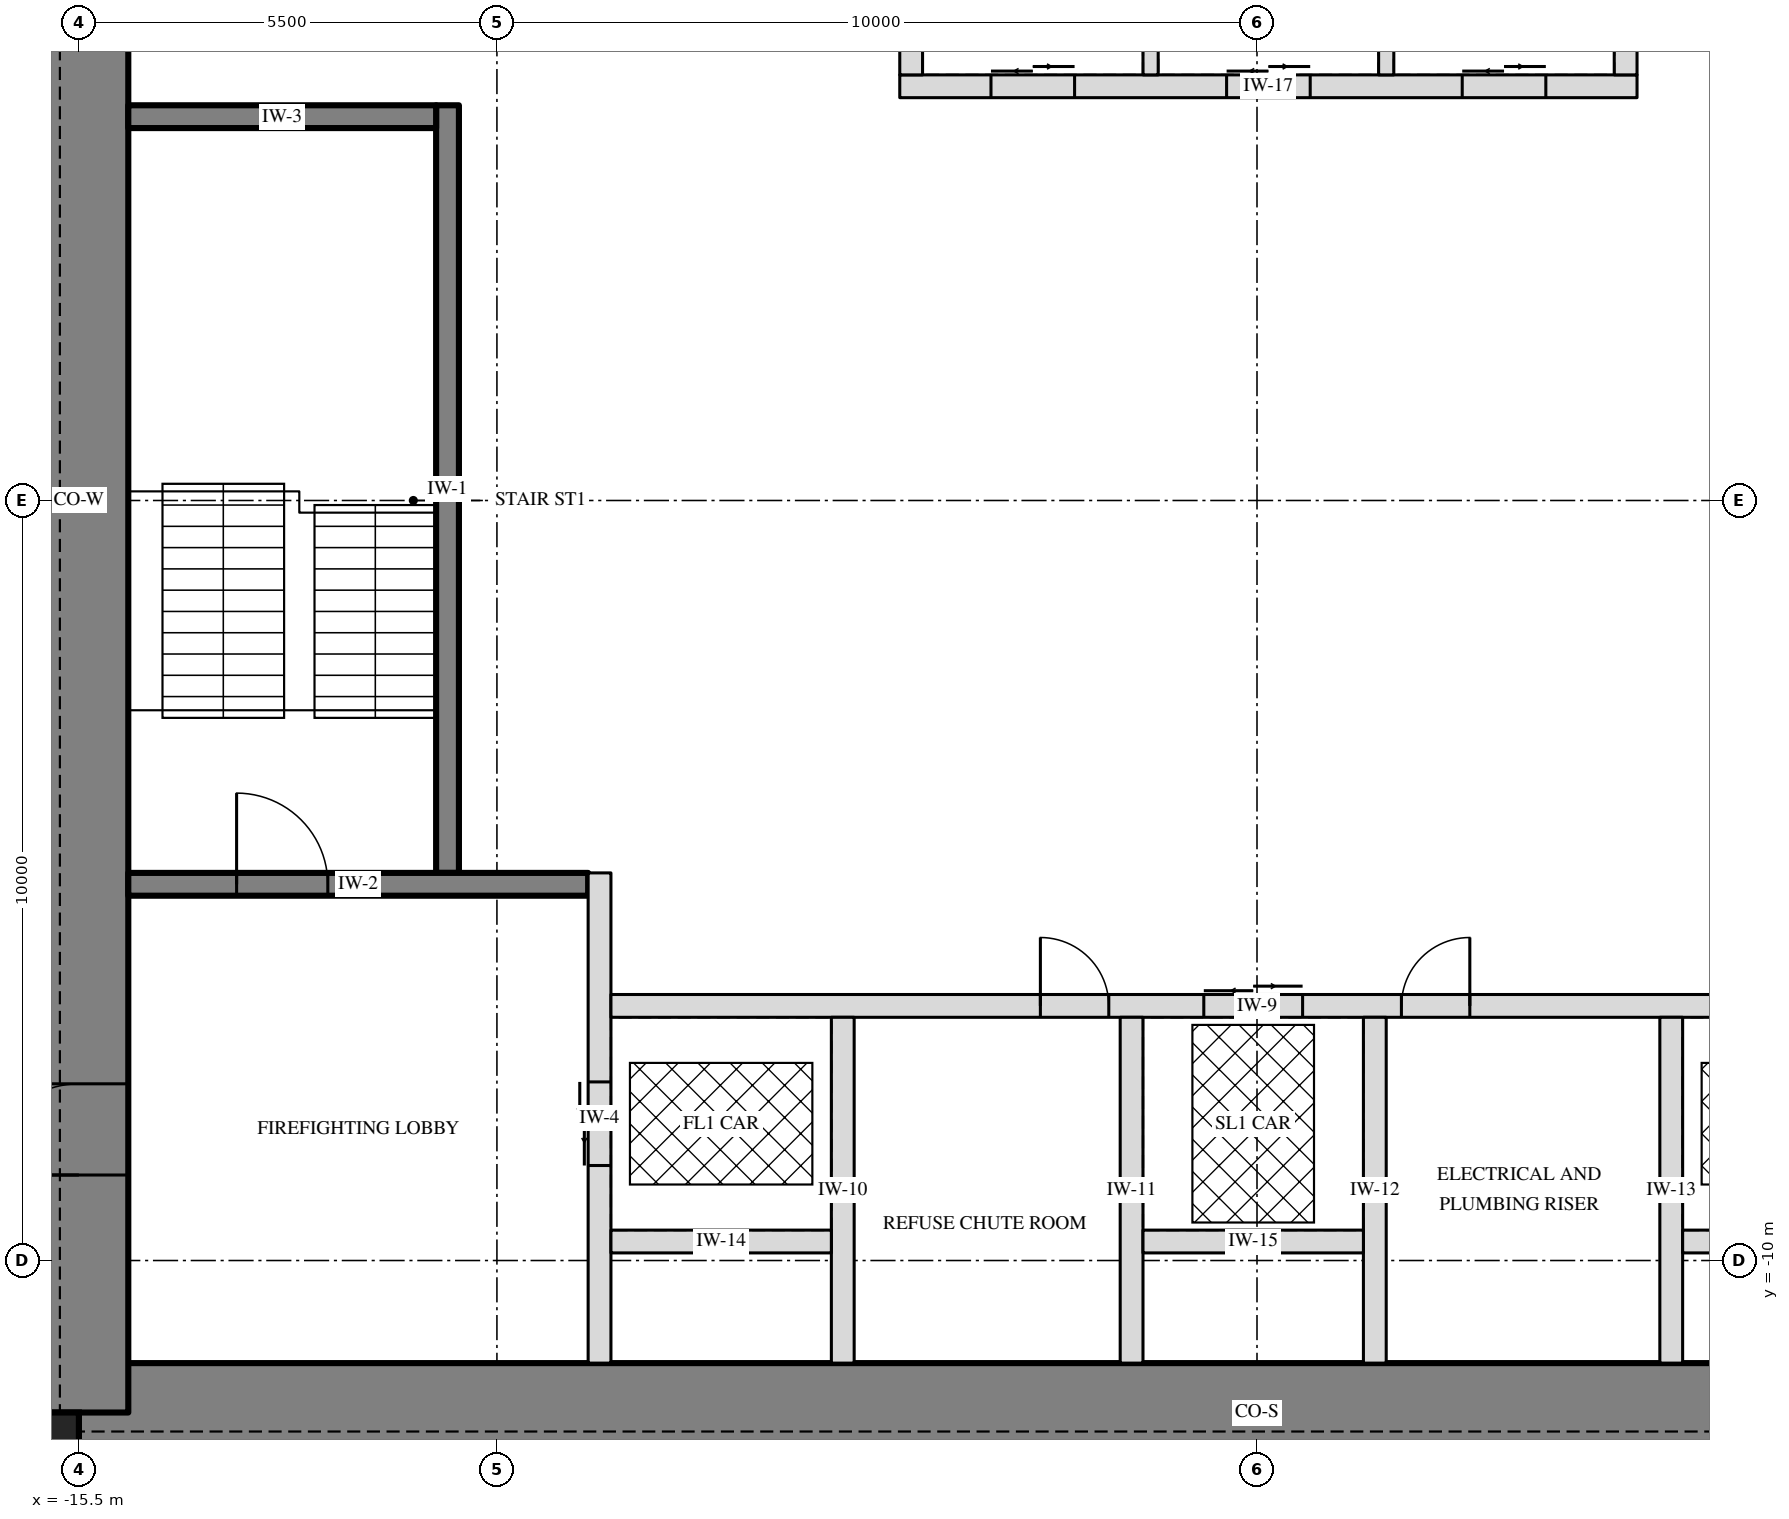
"""IFC4 building model, lengths in metres.
Left out: names, types, materials, properties, quantities, classifications, styles, units other than length and angle.
Written with IfcOpenShell. Run it as: python <this file> out.ifc"""

import sys

from ifc_helpers import new_model, si_unit, direction, frame, frame_2d, origin, origin_2d, place, context, subcontext, project, spatial, rectangle, extrude, element, fill, save


model = new_model("IFC4")
c1 = context("Model", 3, precision=1e-05, world=origin(), true_north=direction((0.0, 1.0)))
c2 = subcontext(c1, "Body", "Model", "MODEL_VIEW")
j1 = project(units=[si_unit("LENGTHUNIT", "METRE"), si_unit("PLANEANGLEUNIT", "RADIAN")], contexts=[c1])
p1 = place(None, origin())
s1 = spatial("IfcSite", under=j1, at=p1, CompositionType="ELEMENT")
p2 = place(p1, origin())
s2 = spatial("IfcBuilding", under=s1, at=p2, CompositionType="ELEMENT")
p3 = place(p2, frame((0.0, 0.0, 285.75)))
s3 = spatial("IfcBuildingStorey", under=s2, at=p3, CompositionType="ELEMENT", Elevation=285.75)
p4 = place(p3, frame((-15.5, -12.0, -0.25), z_axis=(0.0, 0.0, 1.0), x_axis=(1.0, 0.0, 0.0)))
e1 = element("IfcWall", 1, at=p4, inside=s3, PredefinedType="SHEAR", context=c2, shape_type="SweptSolid", body=[
    extrude(rectangle(XDim=31.0, YDim=1.3, at=frame_2d((15.5, 0.0))), origin(), (0.0, 0.0, 1.0), 3.75),
])
p5 = place(p3, frame((-15.5, -12.0, -0.25), z_axis=(0.0, 0.0, 1.0), x_axis=(0.0, 1.0, 0.0)))
e2 = element("IfcWall", 2, at=p5, inside=s3, PredefinedType="SHEAR", context=c2, shape_type="SweptSolid", body=[
    extrude(rectangle(XDim=24.0, YDim=1.3, at=frame_2d((12.0, 0.0))), origin(), (0.0, 0.0, 1.0), 3.75),
])
p6 = place(p5, frame((3.125, 0.0, 0.25)))
e3 = element("IfcOpeningElement", 3, at=p6, cuts=e2, PredefinedType="OPENING", context=c2, shape_type="SweptSolid", body=[
    extrude(rectangle(XDim=1.2, YDim=2.1, at=frame_2d((0.6, 1.05))), frame((0.0, 0.66, 0.0), z_axis=(0.0, -1.0, 0.0), x_axis=(1.0, 0.0, 0.0)), (0.0, 0.0, 1.0), 1.32),
])
p7 = place(p5, frame((19.375, 0.0, 0.25)))
e4 = element("IfcOpeningElement", 4, at=p7, cuts=e2, PredefinedType="OPENING", context=c2, shape_type="SweptSolid", body=[
    extrude(rectangle(XDim=1.8, YDim=2.1, at=frame_2d((0.9, 1.05))), frame((0.0, 0.66, 0.0), z_axis=(0.0, -1.0, 0.0), x_axis=(1.0, 0.0, 0.0)), (0.0, 0.0, 1.0), 1.32),
])
p8 = place(p3, frame((-15.825, -12.325, -0.25), z_axis=(0.0, 0.0, 1.0), x_axis=(1.0, 0.0, 0.0)))
e5 = element("IfcColumn", 5, at=p8, inside=s3, PredefinedType="COLUMN", context=c2, shape_type="SweptSolid", body=[
    extrude(rectangle(XDim=0.65, YDim=0.65, at=origin_2d()), origin(), (0.0, 0.0, 1.0), 3.75),
])
p9 = place(p3, frame((-10.65, -4.9, 0.0), z_axis=(0.0, 0.0, 1.0), x_axis=(0.0, 1.0, 0.0)))
e6 = element("IfcWall", 6, at=p9, inside=s3, PredefinedType="SOLIDWALL", context=c2, shape_type="SweptSolid", body=[
    extrude(rectangle(XDim=10.1, YDim=0.3, at=frame_2d((5.05, 0.0))), origin(), (0.0, 0.0, 1.0), 3.5),
])
p10 = place(p3, frame((-14.85, -5.05, 0.0), z_axis=(0.0, 0.0, 1.0), x_axis=(1.0, 0.0, 0.0)))
e7 = element("IfcWall", 7, at=p10, inside=s3, PredefinedType="SOLIDWALL", context=c2, shape_type="SweptSolid", body=[
    extrude(rectangle(XDim=6.05, YDim=0.3, at=frame_2d((3.025, 0.0))), origin(), (0.0, 0.0, 1.0), 3.5),
])
p11 = place(p10, frame((1.425, 0.0, 0.0)))
e8 = element("IfcOpeningElement", 8, at=p11, cuts=e7, PredefinedType="OPENING", context=c2, shape_type="SweptSolid", body=[
    extrude(rectangle(XDim=1.2, YDim=2.1, at=frame_2d((0.6, 1.05))), frame((0.0, 0.16, 0.0), z_axis=(0.0, -1.0, 0.0), x_axis=(1.0, 0.0, 0.0)), (0.0, 0.0, 1.0), 0.32),
])
p12 = place(p3, frame((-14.85, 5.05, 0.0), z_axis=(0.0, 0.0, 1.0), x_axis=(1.0, 0.0, 0.0)))
e9 = element("IfcWall", 9, at=p12, inside=s3, PredefinedType="SOLIDWALL", context=c2, shape_type="SweptSolid", body=[
    extrude(rectangle(XDim=4.05, YDim=0.3, at=frame_2d((2.025, 0.0))), origin(), (0.0, 0.0, 1.0), 3.5),
])
p13 = place(p3, frame((-8.65, -11.35, 0.0), z_axis=(0.0, 0.0, 1.0), x_axis=(0.0, 1.0, 0.0)))
e10 = element("IfcWall", 10, at=p13, inside=s3, PredefinedType="PARTITIONING", context=c2, shape_type="SweptSolid", body=[
    extrude(rectangle(XDim=6.45, YDim=0.3, at=frame_2d((3.225, 0.0))), origin(), (0.0, 0.0, 1.0), 3.5),
])
p14 = place(p13, frame((2.6, 0.0, 0.0)))
e11 = element("IfcOpeningElement", 11, at=p14, cuts=e10, PredefinedType="OPENING", context=c2, shape_type="SweptSolid", body=[
    extrude(rectangle(XDim=1.1, YDim=2.1, at=frame_2d((0.55, 1.05))), frame((0.0, 0.16, 0.0), z_axis=(0.0, -1.0, 0.0), x_axis=(1.0, 0.0, 0.0)), (0.0, 0.0, 1.0), 0.32),
])
p15 = place(p3, frame((-8.5, -6.65, 0.0), z_axis=(0.0, 0.0, 1.0), x_axis=(1.0, 0.0, 0.0)))
e12 = element("IfcWall", 12, at=p15, inside=s3, PredefinedType="PARTITIONING", context=c2, shape_type="SweptSolid", body=[
    extrude(rectangle(XDim=17.0, YDim=0.3, at=frame_2d((8.5, 0.0))), origin(), (0.0, 0.0, 1.0), 3.5),
])
p16 = place(p15, frame((7.8, 0.0, 0.0)))
e13 = element("IfcOpeningElement", 13, at=p16, cuts=e12, PredefinedType="OPENING", context=c2, shape_type="SweptSolid", body=[
    extrude(rectangle(XDim=1.3, YDim=2.4, at=frame_2d((0.65, 1.2))), frame((0.0, 0.16, 0.0), z_axis=(0.0, -1.0, 0.0), x_axis=(1.0, 0.0, 0.0)), (0.0, 0.0, 1.0), 0.32),
])
p17 = place(p15, frame((5.65, 0.0, 0.0)))
e14 = element("IfcOpeningElement", 14, at=p17, cuts=e12, PredefinedType="OPENING", context=c2, shape_type="SweptSolid", body=[
    extrude(rectangle(XDim=0.9, YDim=2.1, at=frame_2d((0.45, 1.05))), frame((0.0, 0.16, 0.0), z_axis=(0.0, -1.0, 0.0), x_axis=(1.0, 0.0, 0.0)), (0.0, 0.0, 1.0), 0.32),
])
p18 = place(p15, frame((10.4, 0.0, 0.0)))
e15 = element("IfcOpeningElement", 15, at=p18, cuts=e12, PredefinedType="OPENING", context=c2, shape_type="SweptSolid", body=[
    extrude(rectangle(XDim=0.9, YDim=2.1, at=frame_2d((0.45, 1.05))), frame((0.0, 0.16, 0.0), z_axis=(0.0, -1.0, 0.0), x_axis=(1.0, 0.0, 0.0)), (0.0, 0.0, 1.0), 0.32),
])
for number, where, z_axis, x_axis in (
    (16, (-5.45, -11.35, 0.0), (0.0, 0.0, 1.0), (0.0, 1.0, 0.0)),
    (17, (-1.65, -11.35, 0.0), (0.0, 0.0, 1.0), (0.0, 1.0, 0.0)),
    (18, (1.55, -11.35, 0.0), (0.0, 0.0, 1.0), (0.0, 1.0, 0.0)),
    (19, (5.45, -11.35, 0.0), (0.0, 0.0, 1.0), (0.0, 1.0, 0.0)),
):
    element("IfcWall", number, at=place(p3, frame(where, z_axis=z_axis, x_axis=x_axis)), inside=s3, PredefinedType="PARTITIONING", context=c2, shape_type="SweptSolid", body=[
        extrude(rectangle(XDim=4.55, YDim=0.3, at=frame_2d((2.275, 0.0))), origin(), (0.0, 0.0, 1.0), 3.5),
    ])
for number, where, z_axis, x_axis in (
    (20, (-8.5, -9.75, 0.0), (0.0, 0.0, 1.0), (1.0, 0.0, 0.0)),
    (21, (-1.5, -9.75, 0.0), (0.0, 0.0, 1.0), (1.0, 0.0, 0.0)),
    (22, (5.6, -9.75, 0.0), (0.0, 0.0, 1.0), (1.0, 0.0, 0.0)),
):
    element("IfcWall", number, at=place(p3, frame(where, z_axis=z_axis, x_axis=x_axis)), inside=s3, PredefinedType="PARTITIONING", context=c2, shape_type="SweptSolid", body=[
        extrude(rectangle(XDim=2.9, YDim=0.3, at=frame_2d((1.45, 0.0))), origin(), (0.0, 0.0, 1.0), 3.5),
    ])
p19 = place(p3, frame((-4.7, 5.45, 0.0), z_axis=(0.0, 0.0, 1.0), x_axis=(1.0, 0.0, 0.0)))
e23 = element("IfcWall", 23, at=p19, inside=s3, PredefinedType="PARTITIONING", context=c2, shape_type="SweptSolid", body=[
    extrude(rectangle(XDim=9.7, YDim=0.3, at=frame_2d((4.85, 0.0))), origin(), (0.0, 0.0, 1.0), 3.5),
])
p20 = place(p19, frame((1.2, 0.0, 0.0)))
e24 = element("IfcOpeningElement", 24, at=p20, cuts=e23, PredefinedType="OPENING", context=c2, shape_type="SweptSolid", body=[
    extrude(rectangle(XDim=1.1, YDim=2.1, at=frame_2d((0.55, 1.05))), frame((0.0, 0.16, 0.0), z_axis=(0.0, -1.0, 0.0), x_axis=(1.0, 0.0, 0.0)), (0.0, 0.0, 1.0), 0.32),
])
p21 = place(p19, frame((4.3, 0.0, 0.0)))
e25 = element("IfcOpeningElement", 25, at=p21, cuts=e23, PredefinedType="OPENING", context=c2, shape_type="SweptSolid", body=[
    extrude(rectangle(XDim=1.1, YDim=2.1, at=frame_2d((0.55, 1.05))), frame((0.0, 0.16, 0.0), z_axis=(0.0, -1.0, 0.0), x_axis=(1.0, 0.0, 0.0)), (0.0, 0.0, 1.0), 0.32),
])
p22 = place(p19, frame((7.4, 0.0, 0.0)))
e26 = element("IfcOpeningElement", 26, at=p22, cuts=e23, PredefinedType="OPENING", context=c2, shape_type="SweptSolid", body=[
    extrude(rectangle(XDim=1.1, YDim=2.1, at=frame_2d((0.55, 1.05))), frame((0.0, 0.16, 0.0), z_axis=(0.0, -1.0, 0.0), x_axis=(1.0, 0.0, 0.0)), (0.0, 0.0, 1.0), 0.32),
])
for number, where, z_axis, x_axis in (
    (27, (-4.55, 5.6, 0.0), (0.0, 0.0, 1.0), (0.0, 1.0, 0.0)),
    (28, (4.85, 5.6, 0.0), (0.0, 0.0, 1.0), (0.0, 1.0, 0.0)),
):
    element("IfcWall", number, at=place(p3, frame(where, z_axis=z_axis, x_axis=x_axis)), inside=s3, PredefinedType="PARTITIONING", context=c2, shape_type="SweptSolid", body=[
        extrude(rectangle(XDim=2.8, YDim=0.3, at=frame_2d((1.4, 0.0))), origin(), (0.0, 0.0, 1.0), 3.5),
    ])
for number, where, z_axis, x_axis in (
    (29, (-1.4, 5.6, 0.0), (0.0, 0.0, 1.0), (0.0, 1.0, 0.0)),
    (30, (1.7, 5.6, 0.0), (0.0, 0.0, 1.0), (0.0, 1.0, 0.0)),
):
    element("IfcWall", number, at=place(p3, frame(where, z_axis=z_axis, x_axis=x_axis)), inside=s3, PredefinedType="PARTITIONING", context=c2, shape_type="SweptSolid", body=[
        extrude(rectangle(XDim=2.8, YDim=0.2, at=frame_2d((1.4, 0.0))), origin(), (0.0, 0.0, 1.0), 3.5),
    ])
p23 = place(p3, frame((-10.65, 2.8, 0.0), z_axis=(0.0, 0.0, 1.0), x_axis=(1.0, 0.0, 0.0)))
e31 = element("IfcWall", 31, at=p23, inside=s3, PredefinedType="PARTITIONING", context=c2, shape_type="SweptSolid", body=[
    extrude(rectangle(XDim=21.3, YDim=0.3, at=frame_2d((10.65, 0.0))), origin(), (0.0, 0.0, 1.0), 3.5),
])
p24 = place(p23, frame((10.05, 0.0, 0.0)))
e32 = element("IfcOpeningElement", 32, at=p24, cuts=e31, PredefinedType="OPENING", context=c2, shape_type="SweptSolid", body=[
    extrude(rectangle(XDim=1.2, YDim=2.1, at=frame_2d((0.6, 1.05))), frame((0.0, 0.16, 0.0), z_axis=(0.0, -1.0, 0.0), x_axis=(1.0, 0.0, 0.0)), (0.0, 0.0, 1.0), 0.32),
])
p25 = place(p23, frame((19.121, 0.0, 0.0)))
e33 = element("IfcOpeningElement", 33, at=p25, cuts=e31, PredefinedType="OPENING", context=c2, shape_type="SweptSolid", body=[
    extrude(rectangle(XDim=0.9, YDim=2.1, at=frame_2d((0.45, 1.05))), frame((0.0, 0.16, 0.0), z_axis=(0.0, -1.0, 0.0), x_axis=(1.0, 0.0, 0.0)), (0.0, 0.0, 1.0), 0.32),
])
p26 = place(p3, frame((-5.1, -6.65, 0.0), z_axis=(0.0, 0.0, 1.0), x_axis=(0.0, 1.0, 0.0)))
e34 = element("IfcWall", 34, at=p26, inside=s3, PredefinedType="PARTITIONING", context=c2, shape_type="SweptSolid", body=[
    extrude(rectangle(XDim=9.45, YDim=0.3, at=frame_2d((4.725, 0.0))), origin(), (0.0, 0.0, 1.0), 3.5),
])
p27 = place(p26, frame((2.648, 0.0, 0.0)))
e35 = element("IfcOpeningElement", 35, at=p27, cuts=e34, PredefinedType="OPENING", context=c2, shape_type="SweptSolid", body=[
    extrude(rectangle(XDim=0.9, YDim=2.1, at=frame_2d((0.45, 1.05))), frame((0.0, 0.16, 0.0), z_axis=(0.0, -1.0, 0.0), x_axis=(1.0, 0.0, 0.0)), (0.0, 0.0, 1.0), 0.32),
])
p28 = place(p26, frame((7.373, 0.0, 0.0)))
e36 = element("IfcOpeningElement", 36, at=p28, cuts=e34, PredefinedType="OPENING", context=c2, shape_type="SweptSolid", body=[
    extrude(rectangle(XDim=0.9, YDim=2.1, at=frame_2d((0.45, 1.05))), frame((0.0, 0.16, 0.0), z_axis=(0.0, -1.0, 0.0), x_axis=(1.0, 0.0, 0.0)), (0.0, 0.0, 1.0), 0.32),
])
p29 = place(p3, frame((5.1, -6.65, 0.0), z_axis=(0.0, 0.0, 1.0), x_axis=(0.0, 1.0, 0.0)))
e37 = element("IfcWall", 37, at=p29, inside=s3, PredefinedType="PARTITIONING", context=c2, shape_type="SweptSolid", body=[
    extrude(rectangle(XDim=9.45, YDim=0.3, at=frame_2d((4.725, 0.0))), origin(), (0.0, 0.0, 1.0), 3.5),
])
p30 = place(p29, frame((4.275, 0.0, 0.0)))
e38 = element("IfcOpeningElement", 38, at=p30, cuts=e37, PredefinedType="OPENING", context=c2, shape_type="SweptSolid", body=[
    extrude(rectangle(XDim=0.9, YDim=2.1, at=frame_2d((0.45, 1.05))), frame((0.0, 0.16, 0.0), z_axis=(0.0, -1.0, 0.0), x_axis=(1.0, 0.0, 0.0)), (0.0, 0.0, 1.0), 0.32),
])
p31 = place(p3, frame((-10.65, -0.455, 0.0), z_axis=(0.0, 0.0, 1.0), x_axis=(1.0, 0.0, 0.0)))
e39 = element("IfcWall", 39, at=p31, inside=s3, PredefinedType="PARTITIONING", context=c2, shape_type="SweptSolid", body=[
    extrude(rectangle(XDim=5.55, YDim=0.3, at=frame_2d((2.775, 0.0))), origin(), (0.0, 0.0, 1.0), 3.5),
])
p32 = place(p3, frame((-4.85, 5.3, 0.0), z_axis=(0.0, 0.0, 1.0), x_axis=(0.0, 1.0, 0.0)))
e40 = element("IfcWall", 40, at=p32, inside=s3, PredefinedType="PARTITIONING", context=c2, shape_type="SweptSolid", body=[
    extrude(rectangle(XDim=6.05, YDim=0.3, at=frame_2d((3.025, 0.0))), origin(), (0.0, 0.0, 1.0), 3.5),
])
p33 = place(p3, frame((5.15, 5.3, 0.0), z_axis=(0.0, 0.0, 1.0), x_axis=(0.0, 1.0, 0.0)))
e41 = element("IfcWall", 41, at=p33, inside=s3, PredefinedType="PARTITIONING", context=c2, shape_type="SweptSolid", body=[
    extrude(rectangle(XDim=6.05, YDim=0.3, at=frame_2d((3.025, 0.0))), origin(), (0.0, 0.0, 1.0), 3.5),
])
p34 = place(p33, frame((4.225, 0.0, 0.0)))
e42 = element("IfcOpeningElement", 42, at=p34, cuts=e41, PredefinedType="OPENING", context=c2, shape_type="SweptSolid", body=[
    extrude(rectangle(XDim=0.9, YDim=2.1, at=frame_2d((0.45, 1.05))), frame((0.0, 0.16, 0.0), z_axis=(0.0, -1.0, 0.0), x_axis=(1.0, 0.0, 0.0)), (0.0, 0.0, 1.0), 0.32),
])
p35 = place(p11, origin())
e43 = element("IfcDoor", 43, at=p35, inside=s3, OperationType="SINGLE_SWING_LEFT", PredefinedType="DOOR", context=c2, shape_type="SweptSolid", body=[
    extrude(rectangle(XDim=1.2, YDim=2.1, at=frame_2d((0.6, 1.05))), frame((0.0, 0.025, 0.0), z_axis=(0.0, -1.0, 0.0), x_axis=(1.0, 0.0, 0.0)), (0.0, 0.0, 1.0), 0.05),
])
fill(e8, e43)
p36 = place(p6, origin())
e44 = element("IfcDoor", 44, at=p36, inside=s3, OperationType="SINGLE_SWING_LEFT", PredefinedType="DOOR", context=c2, shape_type="SweptSolid", body=[
    extrude(rectangle(XDim=1.2, YDim=2.1, at=frame_2d((0.6, 1.05))), frame((0.0, 0.025, 0.0), z_axis=(0.0, -1.0, 0.0), x_axis=(1.0, 0.0, 0.0)), (0.0, 0.0, 1.0), 0.05),
])
fill(e3, e44)
p37 = place(p14, origin())
e45 = element("IfcDoor", 45, at=p37, inside=s3, OperationType="DOUBLE_DOOR_SLIDING", PredefinedType="DOOR", context=c2, shape_type="SweptSolid", body=[
    extrude(rectangle(XDim=1.1, YDim=2.1, at=frame_2d((0.55, 1.05))), frame((0.0, 0.025, 0.0), z_axis=(0.0, -1.0, 0.0), x_axis=(1.0, 0.0, 0.0)), (0.0, 0.0, 1.0), 0.05),
])
fill(e11, e45)
p38 = place(p20, origin())
e46 = element("IfcDoor", 46, at=p38, inside=s3, OperationType="DOUBLE_DOOR_SLIDING", PredefinedType="DOOR", context=c2, shape_type="SweptSolid", body=[
    extrude(rectangle(XDim=1.1, YDim=2.1, at=frame_2d((0.55, 1.05))), frame((0.0, 0.025, 0.0), z_axis=(0.0, -1.0, 0.0), x_axis=(1.0, 0.0, 0.0)), (0.0, 0.0, 1.0), 0.05),
])
fill(e24, e46)
p39 = place(p21, origin())
e47 = element("IfcDoor", 47, at=p39, inside=s3, OperationType="DOUBLE_DOOR_SLIDING", PredefinedType="DOOR", context=c2, shape_type="SweptSolid", body=[
    extrude(rectangle(XDim=1.1, YDim=2.1, at=frame_2d((0.55, 1.05))), frame((0.0, 0.025, 0.0), z_axis=(0.0, -1.0, 0.0), x_axis=(1.0, 0.0, 0.0)), (0.0, 0.0, 1.0), 0.05),
])
fill(e25, e47)
p40 = place(p22, origin())
e48 = element("IfcDoor", 48, at=p40, inside=s3, OperationType="DOUBLE_DOOR_SLIDING", PredefinedType="DOOR", context=c2, shape_type="SweptSolid", body=[
    extrude(rectangle(XDim=1.1, YDim=2.1, at=frame_2d((0.55, 1.05))), frame((0.0, 0.025, 0.0), z_axis=(0.0, -1.0, 0.0), x_axis=(1.0, 0.0, 0.0)), (0.0, 0.0, 1.0), 0.05),
])
fill(e26, e48)
p41 = place(p16, origin())
e49 = element("IfcDoor", 49, at=p41, inside=s3, OperationType="DOUBLE_DOOR_SLIDING", PredefinedType="DOOR", context=c2, shape_type="SweptSolid", body=[
    extrude(rectangle(XDim=1.3, YDim=2.4, at=frame_2d((0.65, 1.2))), frame((0.0, 0.025, 0.0), z_axis=(0.0, -1.0, 0.0), x_axis=(1.0, 0.0, 0.0)), (0.0, 0.0, 1.0), 0.05),
])
fill(e13, e49)
p42 = place(p24, origin())
e50 = element("IfcDoor", 50, at=p42, inside=s3, OperationType="SINGLE_SWING_LEFT", PredefinedType="DOOR", context=c2, shape_type="SweptSolid", body=[
    extrude(rectangle(XDim=1.2, YDim=2.1, at=frame_2d((0.6, 1.05))), frame((0.0, 0.025, 0.0), z_axis=(0.0, -1.0, 0.0), x_axis=(1.0, 0.0, 0.0)), (0.0, 0.0, 1.0), 0.05),
])
fill(e32, e50)
p43 = place(p17, origin())
e51 = element("IfcDoor", 51, at=p43, inside=s3, OperationType="SINGLE_SWING_LEFT", PredefinedType="DOOR", context=c2, shape_type="SweptSolid", body=[
    extrude(rectangle(XDim=0.9, YDim=2.1, at=frame_2d((0.45, 1.05))), frame((0.0, 0.025, 0.0), z_axis=(0.0, -1.0, 0.0), x_axis=(1.0, 0.0, 0.0)), (0.0, 0.0, 1.0), 0.05),
])
fill(e14, e51)
p44 = place(p18, origin())
e52 = element("IfcDoor", 52, at=p44, inside=s3, OperationType="SINGLE_SWING_RIGHT", PredefinedType="DOOR", context=c2, shape_type="SweptSolid", body=[
    extrude(rectangle(XDim=0.9, YDim=2.1, at=frame_2d((0.45, 1.05))), frame((0.0, 0.025, 0.0), z_axis=(0.0, -1.0, 0.0), x_axis=(1.0, 0.0, 0.0)), (0.0, 0.0, 1.0), 0.05),
])
fill(e15, e52)
p45 = place(p27, origin())
e53 = element("IfcDoor", 53, at=p45, inside=s3, OperationType="SINGLE_SWING_LEFT", PredefinedType="DOOR", context=c2, shape_type="SweptSolid", body=[
    extrude(rectangle(XDim=0.9, YDim=2.1, at=frame_2d((0.45, 1.05))), frame((0.0, 0.025, 0.0), z_axis=(0.0, -1.0, 0.0), x_axis=(1.0, 0.0, 0.0)), (0.0, 0.0, 1.0), 0.05),
])
fill(e35, e53)
p46 = place(p28, origin())
e54 = element("IfcDoor", 54, at=p46, inside=s3, OperationType="SINGLE_SWING_LEFT", PredefinedType="DOOR", context=c2, shape_type="SweptSolid", body=[
    extrude(rectangle(XDim=0.9, YDim=2.1, at=frame_2d((0.45, 1.05))), frame((0.0, 0.025, 0.0), z_axis=(0.0, -1.0, 0.0), x_axis=(1.0, 0.0, 0.0)), (0.0, 0.0, 1.0), 0.05),
])
fill(e36, e54)
p47 = place(p30, origin())
e55 = element("IfcDoor", 55, at=p47, inside=s3, OperationType="SINGLE_SWING_LEFT", PredefinedType="DOOR", context=c2, shape_type="SweptSolid", body=[
    extrude(rectangle(XDim=0.9, YDim=2.1, at=frame_2d((0.45, 1.05))), frame((0.0, 0.025, 0.0), z_axis=(0.0, -1.0, 0.0), x_axis=(1.0, 0.0, 0.0)), (0.0, 0.0, 1.0), 0.05),
])
fill(e38, e55)
save(model, sys.argv[1])
